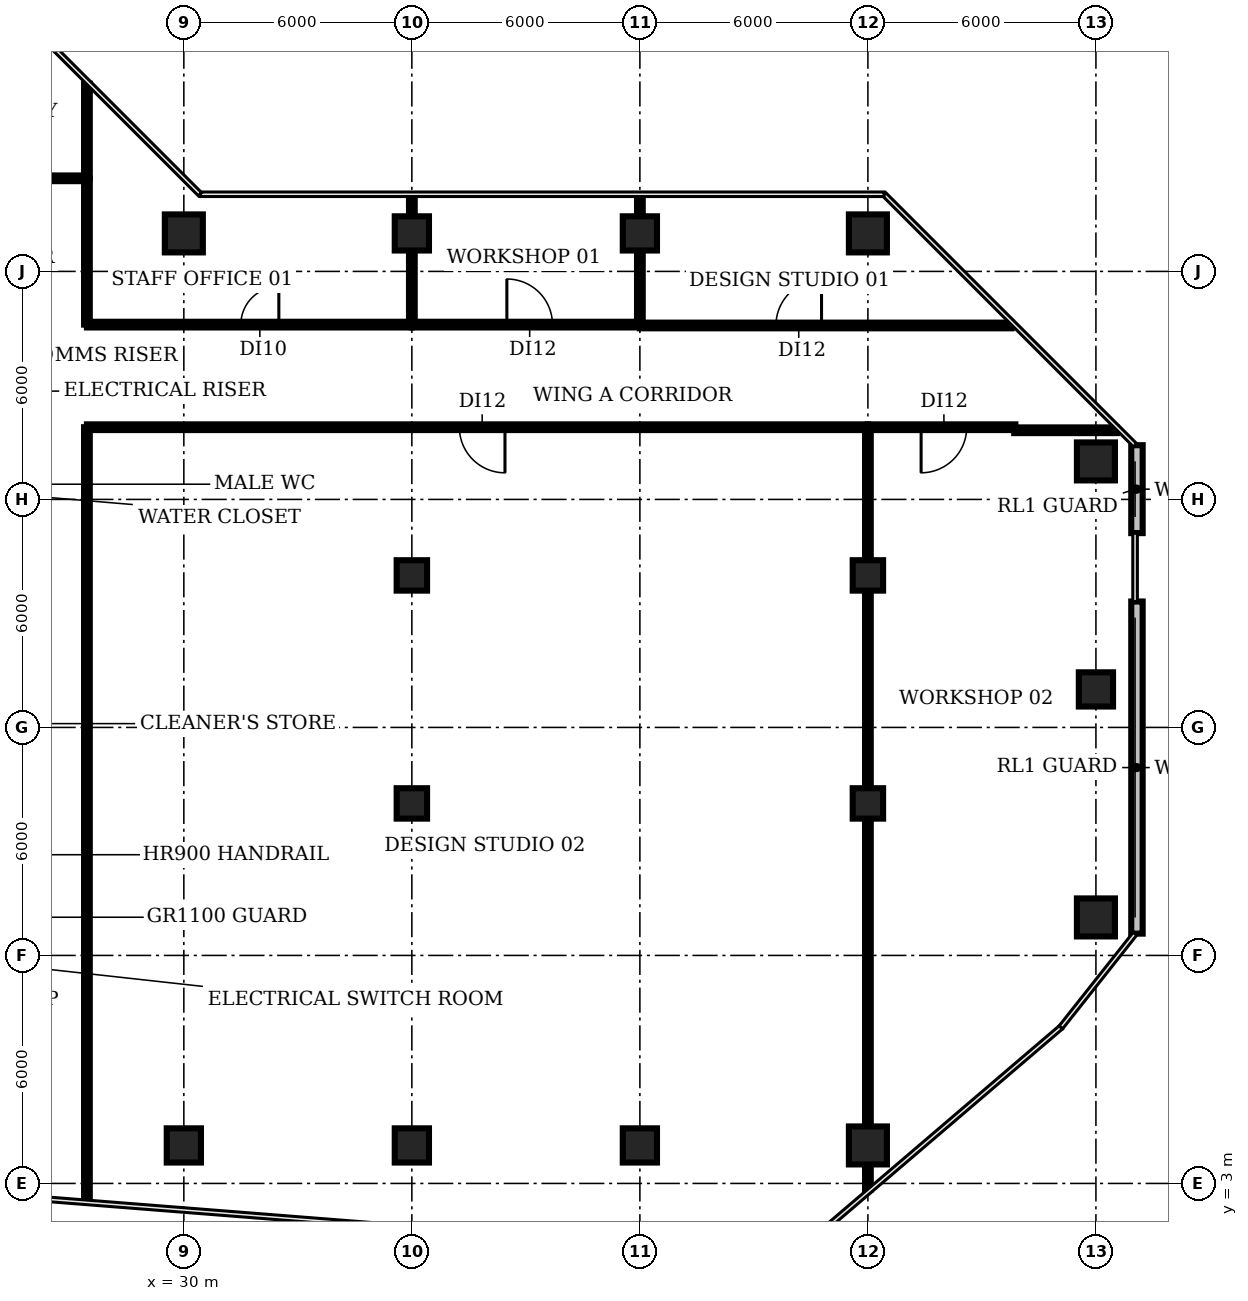
"""IFC4 building model, lengths in metres.
Left out: names, types, materials, properties, quantities, classifications, styles, units other than length and angle.
Written with IfcOpenShell. Run it as: python <this file> out.ifc"""

import sys

from ifc_helpers import new_model, si_unit, direction, frame, frame_2d, origin, origin_2d, place, context, subcontext, project, spatial, rectangle, circle, extrude, element, fill, save


model = new_model("IFC4")
c1 = context("Model", 3, precision=1e-05, world=origin(), true_north=direction((0.0, 1.0)))
c2 = subcontext(c1, "Body", "Model", "MODEL_VIEW")
j1 = project(units=[si_unit("LENGTHUNIT", "METRE"), si_unit("PLANEANGLEUNIT", "RADIAN")], contexts=[c1])
p1 = place(None, origin())
s1 = spatial("IfcSite", under=j1, at=p1, CompositionType="ELEMENT")
p2 = place(p1, origin())
s2 = spatial("IfcBuilding", under=s1, at=p2, CompositionType="ELEMENT")
p3 = place(p2, frame((0.0, 0.0, 129.8)))
s3 = spatial("IfcBuildingStorey", under=s2, at=p3, CompositionType="ELEMENT", Elevation=129.8)
p4 = place(p3, frame((30.0, 4.0, 0.0), z_axis=(0.0, 0.0, 1.0), x_axis=(1.0, 0.0, 0.0)))
e1 = element("IfcColumn", 1, at=p4, inside=s3, PredefinedType="COLUMN", context=c2, shape_type="SweptSolid", body=[
    extrude(rectangle(XDim=0.9, YDim=0.9, at=origin_2d()), origin(), (0.0, 0.0, 1.0), 3.85),
])
p5 = place(p3, frame((30.0, 28.0, 0.0), z_axis=(0.0, 0.0, 1.0), x_axis=(1.0, 0.0, 0.0)))
e2 = element("IfcColumn", 2, at=p5, inside=s3, PredefinedType="COLUMN", context=c2, shape_type="SweptSolid", body=[
    extrude(circle(Radius=0.5, at=origin_2d()), origin(), (0.0, 0.0, 1.0), 3.85),
])
p6 = place(p3, frame((36.0, 4.0, 0.0), z_axis=(0.0, 0.0, 1.0), x_axis=(1.0, 0.0, 0.0)))
e3 = element("IfcColumn", 3, at=p6, inside=s3, PredefinedType="COLUMN", context=c2, shape_type="SweptSolid", body=[
    extrude(rectangle(XDim=0.9, YDim=0.9, at=origin_2d()), origin(), (0.0, 0.0, 1.0), 3.85),
])
for number, where, z_axis, x_axis in (
    (4, (36.0, 13.0, 0.0), (0.0, 0.0, 1.0), (1.0, 0.0, 0.0)),
    (5, (36.0, 19.0, 0.0), (0.0, 0.0, 1.0), (1.0, 0.0, 0.0)),
):
    element("IfcColumn", number, at=place(p3, frame(where, z_axis=z_axis, x_axis=x_axis)), inside=s3, PredefinedType="COLUMN", context=c2, shape_type="SweptSolid", body=[
        extrude(rectangle(XDim=0.8, YDim=0.8, at=origin_2d()), origin(), (0.0, 0.0, 1.0), 3.85),
    ])
for number, where, z_axis, x_axis in (
    (6, (36.0, 28.0, 0.0), (0.0, 0.0, 1.0), (1.0, 0.0, 0.0)),
    (7, (42.0, 4.0, 0.0), (0.0, 0.0, 1.0), (1.0, 0.0, 0.0)),
    (8, (42.0, 28.0, 0.0), (0.0, 0.0, 1.0), (1.0, 0.0, 0.0)),
):
    element("IfcColumn", number, at=place(p3, frame(where, z_axis=z_axis, x_axis=x_axis)), inside=s3, PredefinedType="COLUMN", context=c2, shape_type="SweptSolid", body=[
        extrude(rectangle(XDim=0.9, YDim=0.9, at=origin_2d()), origin(), (0.0, 0.0, 1.0), 3.85),
    ])
p7 = place(p3, frame((48.0, 4.0, 0.0), z_axis=(0.0, 0.0, 1.0), x_axis=(1.0, 0.0, 0.0)))
e9 = element("IfcColumn", 9, at=p7, inside=s3, PredefinedType="COLUMN", context=c2, shape_type="SweptSolid", body=[
    extrude(circle(Radius=0.5, at=origin_2d()), origin(), (0.0, 0.0, 1.0), 3.85),
])
for number, where, z_axis, x_axis in (
    (10, (48.0, 13.0, 0.0), (0.0, 0.0, 1.0), (1.0, 0.0, 0.0)),
    (11, (48.0, 19.0, 0.0), (0.0, 0.0, 1.0), (1.0, 0.0, 0.0)),
):
    element("IfcColumn", number, at=place(p3, frame(where, z_axis=z_axis, x_axis=x_axis)), inside=s3, PredefinedType="COLUMN", context=c2, shape_type="SweptSolid", body=[
        extrude(rectangle(XDim=0.8, YDim=0.8, at=origin_2d()), origin(), (0.0, 0.0, 1.0), 3.85),
    ])
for number, where, z_axis, x_axis in (
    (12, (48.0, 28.0, 0.0), (0.0, 0.0, 1.0), (1.0, 0.0, 0.0)),
    (13, (54.0, 10.0, 0.0), (0.0, 0.0, 1.0), (1.0, 0.0, 0.0)),
):
    element("IfcColumn", number, at=place(p3, frame(where, z_axis=z_axis, x_axis=x_axis)), inside=s3, PredefinedType="COLUMN", context=c2, shape_type="SweptSolid", body=[
        extrude(circle(Radius=0.5, at=origin_2d()), origin(), (0.0, 0.0, 1.0), 3.85),
    ])
p8 = place(p3, frame((54.0, 16.0, 0.0), z_axis=(0.0, 0.0, 1.0), x_axis=(1.0, 0.0, 0.0)))
e14 = element("IfcColumn", 14, at=p8, inside=s3, PredefinedType="COLUMN", context=c2, shape_type="SweptSolid", body=[
    extrude(rectangle(XDim=0.9, YDim=0.9, at=origin_2d()), origin(), (0.0, 0.0, 1.0), 3.85),
])
p9 = place(p3, frame((54.0, 22.0, 0.0), z_axis=(0.0, 0.0, 1.0), x_axis=(1.0, 0.0, 0.0)))
e15 = element("IfcColumn", 15, at=p9, inside=s3, PredefinedType="COLUMN", context=c2, shape_type="SweptSolid", body=[
    extrude(circle(Radius=0.5, at=origin_2d()), origin(), (0.0, 0.0, 1.0), 3.85),
])
p10 = place(p3, frame((55.08, 9.573, 0.0), z_axis=(0.0, 0.0, 1.0), x_axis=(0.0, 1.0, 0.0)))
e16 = element("IfcWall", 16, at=p10, inside=s3, PredefinedType="SOLIDWALL", context=c2, shape_type="SweptSolid", body=[
    extrude(rectangle(XDim=8.74, YDim=0.3, at=frame_2d((4.37, 0.0))), origin(), (0.0, 0.0, 1.0), 3.85),
])
p11 = place(p3, frame((55.08, 20.113, 0.0), z_axis=(0.0, 0.0, 1.0), x_axis=(0.0, 1.0, 0.0)))
e17 = element("IfcWall", 17, at=p11, inside=s3, PredefinedType="SOLIDWALL", context=c2, shape_type="SweptSolid", body=[
    extrude(rectangle(XDim=2.313, YDim=0.3, at=frame_2d((1.157, 0.0))), origin(), (0.0, 0.0, 1.0), 3.85),
])
p12 = place(p3, frame((23.85, 29.45, 0.0), z_axis=(0.0, 0.0, 1.0), x_axis=(1.0, 0.0, 0.0)))
e18 = element("IfcWall", 18, at=p12, inside=s3, PredefinedType="PARTITIONING", context=c2, shape_type="SweptSolid", body=[
    extrude(rectangle(XDim=3.6, YDim=0.15, at=frame_2d((1.8, 0.0))), origin(), (0.0, 0.0, 1.0), 2.83),
])
p13 = place(p12, frame((1.3, 0.0, 0.0)))
e19 = element("IfcOpeningElement", 19, at=p13, cuts=e18, PredefinedType="OPENING", context=c2, shape_type="SweptSolid", body=[
    extrude(rectangle(XDim=0.9, YDim=2.1, at=frame_2d((0.45, 1.05))), frame((0.0, 0.085, 0.0), z_axis=(0.0, -1.0, 0.0), x_axis=(1.0, 0.0, 0.0)), (0.0, 0.0, 1.0), 0.17),
])
p14 = place(p3, frame((27.45, 2.55, 0.0), z_axis=(0.0, 0.0, 1.0), x_axis=(0.0, 1.0, 0.0)))
e20 = element("IfcWall", 20, at=p14, inside=s3, PredefinedType="PARTITIONING", context=c2, shape_type="SweptSolid", body=[
    extrude(rectangle(XDim=20.35, YDim=0.15, at=frame_2d((10.175, 0.0))), origin(), (0.0, 0.0, 1.0), 2.83),
])
p15 = place(p3, frame((27.45, 25.6, 0.0), z_axis=(0.0, 0.0, 1.0), x_axis=(0.0, 1.0, 0.0)))
e21 = element("IfcWall", 21, at=p15, inside=s3, PredefinedType="PARTITIONING", context=c2, shape_type="SweptSolid", body=[
    extrude(rectangle(XDim=3.85, YDim=0.15, at=frame_2d((1.925, 0.0))), origin(), (0.0, 0.0, 1.0), 2.83),
])
p16 = place(p3, frame((27.45, 25.6, 0.0), z_axis=(0.0, 0.0, 1.0), x_axis=(1.0, 0.0, 0.0)))
e22 = element("IfcWall", 22, at=p16, inside=s3, PredefinedType="PARTITIONING", context=c2, shape_type="SweptSolid", body=[
    extrude(rectangle(XDim=8.55, YDim=0.15, at=frame_2d((4.275, 0.0))), origin(), (0.0, 0.0, 1.0), 2.83),
])
p17 = place(p16, frame((4.05, 0.0, 0.0)))
e23 = element("IfcOpeningElement", 23, at=p17, cuts=e22, PredefinedType="OPENING", context=c2, shape_type="SweptSolid", body=[
    extrude(rectangle(XDim=1.0, YDim=2.1, at=frame_2d((0.5, 1.05))), frame((0.0, 0.085, 0.0), z_axis=(0.0, -1.0, 0.0), x_axis=(1.0, 0.0, 0.0)), (0.0, 0.0, 1.0), 0.17),
])
p18 = place(p3, frame((27.45, 29.45, 0.0), z_axis=(0.0, 0.0, 1.0), x_axis=(0.0, 1.0, 0.0)))
e24 = element("IfcWall", 24, at=p18, inside=s3, PredefinedType="PARTITIONING", context=c2, shape_type="SweptSolid", body=[
    extrude(rectangle(XDim=2.49, YDim=0.15, at=frame_2d((1.245, 0.0))), origin(), (0.0, 0.0, 1.0), 2.83),
])
p19 = place(p3, frame((36.0, 25.6, 0.0), z_axis=(0.0, 0.0, 1.0), x_axis=(0.0, 1.0, 0.0)))
e25 = element("IfcWall", 25, at=p19, inside=s3, PredefinedType="PARTITIONING", context=c2, shape_type="SweptSolid", body=[
    extrude(rectangle(XDim=3.38, YDim=0.15, at=frame_2d((1.69, 0.0))), origin(), (0.0, 0.0, 1.0), 2.83),
])
p20 = place(p3, frame((36.0, 25.6, 0.0), z_axis=(0.0, 0.0, 1.0), x_axis=(1.0, 0.0, 0.0)))
e26 = element("IfcWall", 26, at=p20, inside=s3, PredefinedType="PARTITIONING", context=c2, shape_type="SweptSolid", body=[
    extrude(rectangle(XDim=6.0, YDim=0.15, at=frame_2d((3.0, 0.0))), origin(), (0.0, 0.0, 1.0), 2.83),
])
p21 = place(p20, frame((2.5, 0.0, 0.0)))
e27 = element("IfcOpeningElement", 27, at=p21, cuts=e26, PredefinedType="OPENING", context=c2, shape_type="SweptSolid", body=[
    extrude(rectangle(XDim=1.2, YDim=2.1, at=frame_2d((0.6, 1.05))), frame((0.0, 0.085, 0.0), z_axis=(0.0, -1.0, 0.0), x_axis=(1.0, 0.0, 0.0)), (0.0, 0.0, 1.0), 0.17),
])
p22 = place(p3, frame((42.0, 25.577, 0.0), z_axis=(0.0, 0.0, 1.0), x_axis=(1.0, 0.0, 0.0)))
e28 = element("IfcWall", 28, at=p22, inside=s3, PredefinedType="PARTITIONING", context=c2, shape_type="SweptSolid", body=[
    extrude(rectangle(XDim=9.78, YDim=0.15, at=frame_2d((4.89, 0.0))), origin(), (0.0, 0.0, 1.0), 2.83),
])
p23 = place(p22, frame((3.58, 0.0, 0.0)))
e29 = element("IfcOpeningElement", 29, at=p23, cuts=e28, PredefinedType="OPENING", context=c2, shape_type="SweptSolid", body=[
    extrude(rectangle(XDim=1.2, YDim=2.1, at=frame_2d((0.6, 1.05))), frame((0.0, 0.085, 0.0), z_axis=(0.0, -1.0, 0.0), x_axis=(1.0, 0.0, 0.0)), (0.0, 0.0, 1.0), 0.17),
])
p24 = place(p3, frame((42.0, 25.6, 0.0), z_axis=(0.0, 0.0, 1.0), x_axis=(0.0, 1.0, 0.0)))
e30 = element("IfcWall", 30, at=p24, inside=s3, PredefinedType="PARTITIONING", context=c2, shape_type="SweptSolid", body=[
    extrude(rectangle(XDim=3.38, YDim=0.15, at=frame_2d((1.69, 0.0))), origin(), (0.0, 0.0, 1.0), 2.83),
])
p25 = place(p3, frame((48.0, 2.84, 0.0), z_axis=(0.0, 0.0, 1.0), x_axis=(0.0, 1.0, 0.0)))
e31 = element("IfcWall", 31, at=p25, inside=s3, PredefinedType="PARTITIONING", context=c2, shape_type="SweptSolid", body=[
    extrude(rectangle(XDim=20.06, YDim=0.15, at=frame_2d((10.03, 0.0))), origin(), (0.0, 0.0, 1.0), 2.83),
])
p26 = place(p3, frame((48.0, 22.9, 0.0), z_axis=(0.0, 0.0, 1.0), x_axis=(-1.0, 0.0, 0.0)))
e32 = element("IfcWall", 32, at=p26, inside=s3, PredefinedType="PARTITIONING", context=c2, shape_type="SweptSolid", body=[
    extrude(rectangle(XDim=20.55, YDim=0.15, at=frame_2d((10.275, 0.0))), origin(), (0.0, 0.0, 1.0), 2.83),
])
p27 = place(p26, frame((9.55, 0.0, 0.0)))
e33 = element("IfcOpeningElement", 33, at=p27, cuts=e32, PredefinedType="OPENING", context=c2, shape_type="SweptSolid", body=[
    extrude(rectangle(XDim=1.2, YDim=2.1, at=frame_2d((0.6, 1.05))), frame((0.0, 0.085, 0.0), z_axis=(0.0, -1.0, 0.0), x_axis=(1.0, 0.0, 0.0)), (0.0, 0.0, 1.0), 0.17),
])
p28 = place(p3, frame((51.85, 22.82, 0.0), z_axis=(0.0, 0.0, 1.0), x_axis=(1.0, 0.0, 0.0)))
e34 = element("IfcWall", 34, at=p28, inside=s3, PredefinedType="PARTITIONING", context=c2, shape_type="SweptSolid", body=[
    extrude(rectangle(XDim=2.702, YDim=0.15, at=frame_2d((1.351, 0.0))), origin(), (0.0, 0.0, 1.0), 2.83),
])
p29 = place(p3, frame((51.88, 22.9, 0.0), z_axis=(0.0, 0.0, 1.0), x_axis=(-1.0, 0.0, 0.0)))
e35 = element("IfcWall", 35, at=p29, inside=s3, PredefinedType="PARTITIONING", context=c2, shape_type="SweptSolid", body=[
    extrude(rectangle(XDim=3.88, YDim=0.15, at=frame_2d((1.94, 0.0))), origin(), (0.0, 0.0, 1.0), 2.83),
])
p30 = place(p29, frame((1.28, 0.0, 0.0)))
e36 = element("IfcOpeningElement", 36, at=p30, cuts=e35, PredefinedType="OPENING", context=c2, shape_type="SweptSolid", body=[
    extrude(rectangle(XDim=1.2, YDim=2.1, at=frame_2d((0.6, 1.05))), frame((0.0, 0.085, 0.0), z_axis=(0.0, -1.0, 0.0), x_axis=(1.0, 0.0, 0.0)), (0.0, 0.0, 1.0), 0.17),
])
p31 = place(p17, origin())
e37 = element("IfcDoor", 37, at=p31, inside=s3, OperationType="SINGLE_SWING_RIGHT", PredefinedType="DOOR", context=c2, shape_type="SweptSolid", body=[
    extrude(rectangle(XDim=1.0, YDim=2.1, at=frame_2d((0.5, 1.05))), frame((0.0, 0.025, 0.0), z_axis=(0.0, -1.0, 0.0), x_axis=(1.0, 0.0, 0.0)), (0.0, 0.0, 1.0), 0.05),
])
fill(e23, e37)
p32 = place(p21, origin())
e38 = element("IfcDoor", 38, at=p32, inside=s3, OperationType="SINGLE_SWING_LEFT", PredefinedType="DOOR", context=c2, shape_type="SweptSolid", body=[
    extrude(rectangle(XDim=1.2, YDim=2.1, at=frame_2d((0.6, 1.05))), frame((0.0, 0.025, 0.0), z_axis=(0.0, -1.0, 0.0), x_axis=(1.0, 0.0, 0.0)), (0.0, 0.0, 1.0), 0.05),
])
fill(e27, e38)
p33 = place(p23, origin())
e39 = element("IfcDoor", 39, at=p33, inside=s3, OperationType="SINGLE_SWING_RIGHT", PredefinedType="DOOR", context=c2, shape_type="SweptSolid", body=[
    extrude(rectangle(XDim=1.2, YDim=2.1, at=frame_2d((0.6, 1.05))), frame((0.0, 0.025, 0.0), z_axis=(0.0, -1.0, 0.0), x_axis=(1.0, 0.0, 0.0)), (0.0, 0.0, 1.0), 0.05),
])
fill(e29, e39)
p34 = place(p27, origin())
e40 = element("IfcDoor", 40, at=p34, inside=s3, OperationType="SINGLE_SWING_LEFT", PredefinedType="DOOR", context=c2, shape_type="SweptSolid", body=[
    extrude(rectangle(XDim=1.2, YDim=2.1, at=frame_2d((0.6, 1.05))), frame((0.0, 0.025, 0.0), z_axis=(0.0, -1.0, 0.0), x_axis=(1.0, 0.0, 0.0)), (0.0, 0.0, 1.0), 0.05),
])
fill(e33, e40)
p35 = place(p30, origin())
e41 = element("IfcDoor", 41, at=p35, inside=s3, OperationType="SINGLE_SWING_RIGHT", PredefinedType="DOOR", context=c2, shape_type="SweptSolid", body=[
    extrude(rectangle(XDim=1.2, YDim=2.1, at=frame_2d((0.6, 1.05))), frame((0.0, 0.025, 0.0), z_axis=(0.0, -1.0, 0.0), x_axis=(1.0, 0.0, 0.0)), (0.0, 0.0, 1.0), 0.05),
])
fill(e36, e41)
save(model, sys.argv[1])
